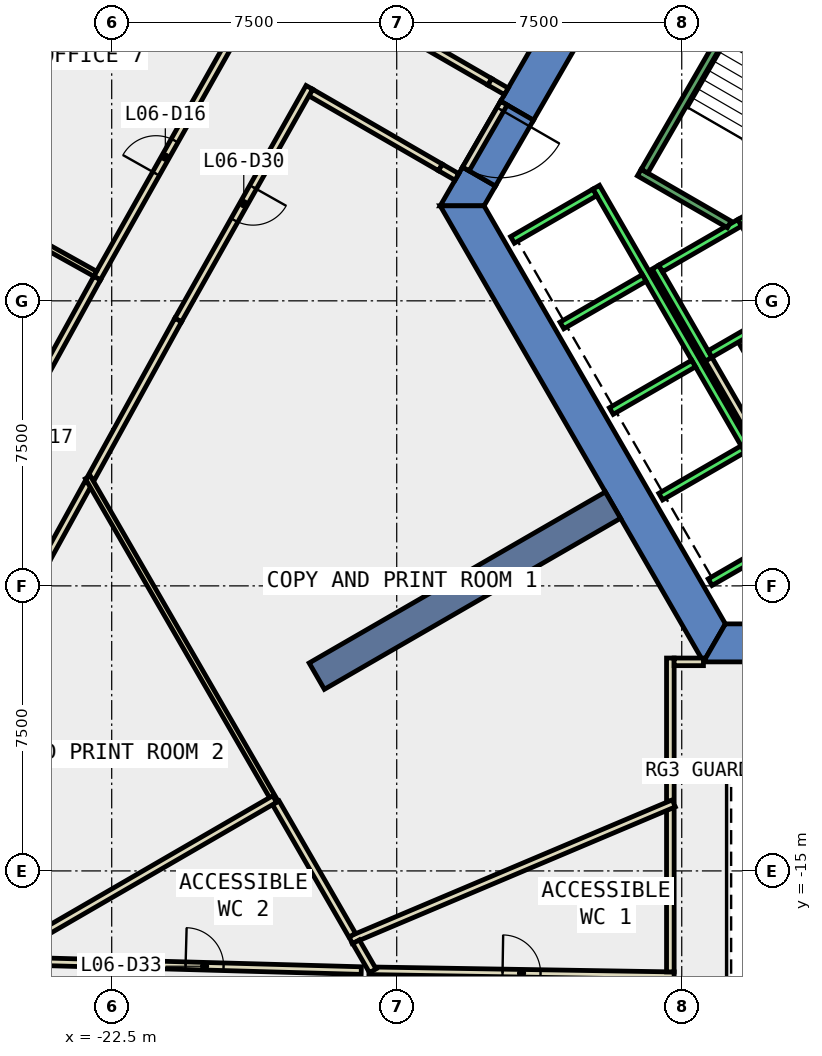
"""IFC4 building model, lengths in metres.
Left out: names, types, materials, properties, quantities, classifications, styles, units other than length and angle.
Written with IfcOpenShell. Run it as: python <this file> out.ifc"""

import sys

from ifc_helpers import new_model, si_unit, direction, frame, frame_2d, origin, place, context, subcontext, project, spatial, polyline, rectangle, outline, extrude, element, fill, save


model = new_model("IFC4")
c1 = context("Model", 3, precision=1e-05, world=origin(), true_north=direction((0.0, 1.0)))
c2 = subcontext(c1, "Body", "Model", "MODEL_VIEW")
j1 = project(units=[si_unit("LENGTHUNIT", "METRE"), si_unit("PLANEANGLEUNIT", "RADIAN")], contexts=[c1])
p1 = place(None, origin())
s1 = spatial("IfcSite", under=j1, at=p1, CompositionType="ELEMENT")
p2 = place(p1, origin())
s2 = spatial("IfcBuilding", under=s1, at=p2, CompositionType="ELEMENT")
p3 = place(p2, frame((0.0, 0.0, 35.0)))
s3 = spatial("IfcBuildingStorey", under=s2, at=p3, CompositionType="ELEMENT", Elevation=35.0)
p4 = place(p3, frame((0.0, 0.0, -0.6)))
e1 = element("IfcWall", 1, at=p4, inside=s3, PredefinedType="SHEAR", context=c2, shape_type="SweptSolid", body=[
    extrude(outline(polyline([(-12.267, 5.252), (-11.402, 4.752), (-6.351, 13.5), (-6.928, 14.5), (-12.267, 5.252)])), origin(), (0.0, 0.0, 1.0), 4.4),
])
p5 = place(p3, frame((0.0, 0.0, -0.6)))
e2 = element("IfcWall", 2, at=p5, inside=s3, PredefinedType="SHEAR", context=c2, shape_type="SweptSolid", body=[
    extrude(outline(polyline([(-12.402, 3.02), (-13.267, 3.52), (-13.856, 2.5), (-12.702, 2.5), (-12.402, 3.02)])), origin(), (0.0, 0.0, 1.0), 4.4),
])
p6 = place(p3, frame((0.0, 0.0, 3.6)))
e3 = element("IfcWall", 3, at=p6, inside=s3, PredefinedType="SHEAR", context=c2, shape_type="SweptSolid", body=[
    extrude(outline(polyline([(-13.267, 3.52), (-12.402, 3.02), (-11.402, 4.752), (-12.267, 5.252), (-13.267, 3.52)])), origin(), (0.0, 0.0, 1.0), 0.2),
])
p7 = place(p3, frame((0.0, 0.0, -0.6)))
e4 = element("IfcWall", 4, at=p7, inside=s3, PredefinedType="SHEAR", context=c2, shape_type="SweptSolid", body=[
    extrude(outline(polyline([(-13.856, 2.5), (-6.928, -9.5), (-6.351, -8.5), (-12.702, 2.5), (-13.856, 2.5)])), origin(), (0.0, 0.0, 1.0), 4.4),
])
p8 = place(p3, frame((0.0, 0.0, -0.6)))
e5 = element("IfcWall", 5, at=p8, inside=s3, PredefinedType="SHEAR", context=c2, shape_type="SweptSolid", body=[
    extrude(outline(polyline([(3.75, -9.5), (3.75, -8.5), (-6.351, -8.5), (-6.928, -9.5), (3.75, -9.5)])), origin(), (0.0, 0.0, 1.0), 4.4),
])
p9 = place(p3, frame((-9.31, -5.375, -0.6), z_axis=(0.0, 0.0, 1.0), x_axis=(-0.866017533419, -0.500013631625, 0.0)))
e6 = element("IfcWall", 6, at=p9, inside=s3, PredefinedType="SHEAR", context=c2, shape_type="SweptSolid", body=[
    extrude(rectangle(XDim=9.0, YDim=0.8, at=frame_2d((4.5, 0.0))), origin(), (0.0, 0.0, 1.0), 4.4),
])
p10 = place(p3, frame((-15.963, 7.733, 0.0), z_axis=(0.0, 0.0, 1.0), x_axis=(0.865965832374, -0.500103166518, 0.0)))
e7 = element("IfcWall", 7, at=p10, inside=s3, PredefinedType="PARTITIONING", context=c2, shape_type="SweptSolid", body=[
    extrude(rectangle(XDim=3.941, YDim=0.2, at=frame_2d((1.971, 0.0))), origin(), (0.0, 0.0, 1.0), 3.8),
])
p11 = place(p3, frame((-17.261, 5.48, 0.0), z_axis=(0.0, 0.0, 1.0), x_axis=(0.865949187497, -0.500131987253, 0.0)))
e8 = element("IfcWall", 8, at=p11, inside=s3, PredefinedType="PARTITIONING", context=c2, shape_type="SweptSolid", body=[
    extrude(rectangle(XDim=3.939, YDim=0.2, at=frame_2d((1.969, 0.0))), origin(), (0.0, 0.0, 1.0), 3.8),
])
p12 = place(p3, frame((-17.299, 5.617, 0.0), z_axis=(0.0, 0.0, 1.0), x_axis=(-0.491166441632, -0.871065741844, 0.0)))
e9 = element("IfcWall", 9, at=p12, inside=s3, PredefinedType="PARTITIONING", context=c2, shape_type="SweptSolid", body=[
    extrude(rectangle(XDim=7.028, YDim=0.2, at=frame_2d((3.514, 0.0))), origin(), (0.0, 0.0, 1.0), 3.8),
])
p13 = place(p12, frame((3.014, 0.0, 0.0)))
e10 = element("IfcOpeningElement", 10, at=p13, cuts=e9, PredefinedType="OPENING", context=c2, shape_type="SweptSolid", body=[
    extrude(rectangle(XDim=1.0, YDim=2.1, at=frame_2d((0.5, 1.05))), frame((0.0, 0.11, 0.0), z_axis=(0.0, -1.0, 0.0), x_axis=(1.0, 0.0, 0.0)), (0.0, 0.0, 1.0), 0.22),
])
p14 = place(p3, frame((-20.751, -0.505, 0.0), z_axis=(0.0, 0.0, 1.0), x_axis=(-0.482566110981, -0.875859548405, 0.0)))
e11 = element("IfcWall", 11, at=p14, inside=s3, PredefinedType="PARTITIONING", context=c2, shape_type="SweptSolid", body=[
    extrude(rectangle(XDim=4.748, YDim=0.2, at=frame_2d((2.374, 0.0))), origin(), (0.0, 0.0, 1.0), 3.8),
])
p15 = place(p3, frame((-15.73, -17.627, 0.0), z_axis=(0.0, 0.0, 1.0), x_axis=(0.999866746812, -0.016324479129, 0.0)))
e12 = element("IfcWall", 12, at=p15, inside=s3, PredefinedType="PARTITIONING", context=c2, shape_type="SweptSolid", body=[
    extrude(rectangle(XDim=8.031, YDim=0.2, at=frame_2d((4.016, 0.0))), origin(), (0.0, 0.0, 1.0), 3.8),
])
p16 = place(p15, frame((3.515, 0.0, 0.0)))
e13 = element("IfcOpeningElement", 13, at=p16, cuts=e12, PredefinedType="OPENING", context=c2, shape_type="SweptSolid", body=[
    extrude(rectangle(XDim=1.0, YDim=2.1, at=frame_2d((0.5, 1.05))), frame((0.0, 0.11, 0.0), z_axis=(0.0, -1.0, 0.0), x_axis=(1.0, 0.0, 0.0)), (0.0, 0.0, 1.0), 0.22),
])
p17 = place(p3, frame((-23.114, -4.794, 0.0), z_axis=(0.0, 0.0, 1.0), x_axis=(-0.482482362329, -0.875905685586, 0.0)))
e14 = element("IfcWall", 14, at=p17, inside=s3, PredefinedType="PARTITIONING", context=c2, shape_type="SweptSolid", body=[
    extrude(rectangle(XDim=2.311, YDim=0.2, at=frame_2d((1.156, 0.0))), origin(), (0.0, 0.0, 1.0), 3.8),
])
p18 = place(p3, frame((-24.18, -17.393, 0.0), z_axis=(0.0, 0.0, 1.0), x_axis=(0.999611380121, -0.02787631132, 0.0)))
e15 = element("IfcWall", 15, at=p18, inside=s3, PredefinedType="PARTITIONING", context=c2, shape_type="SweptSolid", body=[
    extrude(rectangle(XDim=8.25, YDim=0.2, at=frame_2d((4.125, 0.0))), origin(), (0.0, 0.0, 1.0), 3.8),
])
p19 = place(p18, frame((3.625, 0.0, 0.0)))
e16 = element("IfcOpeningElement", 16, at=p19, cuts=e15, PredefinedType="OPENING", context=c2, shape_type="SweptSolid", body=[
    extrude(rectangle(XDim=1.0, YDim=2.1, at=frame_2d((0.5, 1.05))), frame((0.0, 0.11, 0.0), z_axis=(0.0, -1.0, 0.0), x_axis=(1.0, 0.0, 0.0)), (0.0, 0.0, 1.0), 0.22),
])
p20 = place(p3, frame((-22.884, 0.598, 0.0), z_axis=(0.0, 0.0, 1.0), x_axis=(0.491206176175, 0.871043335597, 0.0)))
e17 = element("IfcWall", 17, at=p20, inside=s3, PredefinedType="PARTITIONING", context=c2, shape_type="SweptSolid", body=[
    extrude(rectangle(XDim=7.309, YDim=0.2, at=frame_2d((3.654, 0.0))), origin(), (0.0, 0.0, 1.0), 3.8),
])
p21 = place(p20, frame((3.154, 0.0, 0.0)))
e18 = element("IfcOpeningElement", 18, at=p21, cuts=e17, PredefinedType="OPENING", context=c2, shape_type="SweptSolid", body=[
    extrude(rectangle(XDim=1.0, YDim=2.1, at=frame_2d((0.5, 1.05))), frame((0.0, 0.11, 0.0), z_axis=(0.0, -1.0, 0.0), x_axis=(1.0, 0.0, 0.0)), (0.0, 0.0, 1.0), 0.22),
])
p22 = place(p3, frame((-26.373, -5.736, 0.0), z_axis=(0.0, 0.0, 1.0), x_axis=(0.482587313112, 0.875847866483, 0.0)))
e19 = element("IfcWall", 19, at=p22, inside=s3, PredefinedType="PARTITIONING", context=c2, shape_type="SweptSolid", body=[
    extrude(rectangle(XDim=7.232, YDim=0.2, at=frame_2d((3.616, 0.0))), origin(), (0.0, 0.0, 1.0), 3.8),
])
p23 = place(p22, frame((3.191, 0.0, 0.0)))
e20 = element("IfcOpeningElement", 20, at=p23, cuts=e19, PredefinedType="OPENING", context=c2, shape_type="SweptSolid", body=[
    extrude(rectangle(XDim=1.0, YDim=2.1, at=frame_2d((0.5, 1.05))), frame((0.0, 0.11, 0.0), z_axis=(0.0, -1.0, 0.0), x_axis=(1.0, 0.0, 0.0)), (0.0, 0.0, 1.0), 0.22),
])
p24 = place(p3, frame((-5.126, -2.422, 0.0), z_axis=(0.0, 0.0, 1.0), x_axis=(-0.500062241894, 0.865989465428, 0.0)))
e21 = element("IfcWall", 21, at=p24, inside=s3, PredefinedType="PARTITIONING", context=c2, shape_type="SweptSolid", body=[
    extrude(rectangle(XDim=1.7, YDim=0.2, at=frame_2d((0.85, 0.0))), origin(), (0.0, 0.0, 1.0), 3.8),
])
p25 = place(p3, frame((-5.492, -3.788, 0.0), z_axis=(0.0, 0.0, 1.0), x_axis=(-0.500008949224, 0.866020236886, 0.0)))
e22 = element("IfcWall", 22, at=p25, inside=s3, PredefinedType="PARTITIONING", context=c2, shape_type="SweptSolid", body=[
    extrude(rectangle(XDim=2.68, YDim=0.2, at=frame_2d((1.34, 0.0))), origin(), (0.0, 0.0, 1.0), 3.8),
])
p26 = place(p3, frame((-7.8, -13.161, 0.0), z_axis=(0.0, 0.0, 1.0), x_axis=(0.0, 1.0, 0.0)))
e23 = element("IfcWall", 23, at=p26, inside=s3, PredefinedType="PARTITIONING", context=c2, shape_type="SweptSolid", body=[
    extrude(rectangle(XDim=3.762, YDim=0.2, at=frame_2d((1.881, 0.0))), origin(), (0.0, 0.0, 1.0), 3.8),
])
p27 = place(p3, frame((-7.7, -9.499, 0.0), z_axis=(0.0, 0.0, 1.0), x_axis=(1.0, 0.0, 0.0)))
e24 = element("IfcWall", 24, at=p27, inside=s3, PredefinedType="PARTITIONING", context=c2, shape_type="SweptSolid", body=[
    extrude(rectangle(XDim=0.771, YDim=0.2, at=frame_2d((0.385, 0.0))), origin(), (0.0, 0.0, 1.0), 3.8),
])
p28 = place(p3, frame((-7.8, -17.657, 0.0), z_axis=(0.0, 0.0, 1.0), x_axis=(0.0, 1.0, 0.0)))
e25 = element("IfcWall", 25, at=p28, inside=s3, PredefinedType="PARTITIONING", context=c2, shape_type="SweptSolid", body=[
    extrude(rectangle(XDim=4.296, YDim=0.2, at=frame_2d((2.148, 0.0))), origin(), (0.0, 0.0, 1.0), 3.8),
])
p29 = place(p3, frame((-7.708, -13.222, 0.0), z_axis=(0.0, 0.0, 1.0), x_axis=(-0.921093468555, -0.389341523839, 0.0)))
e26 = element("IfcWall", 26, at=p29, inside=s3, PredefinedType="PARTITIONING", context=c2, shape_type="SweptSolid", body=[
    extrude(rectangle(XDim=9.233, YDim=0.2, at=frame_2d((4.617, 0.0))), origin(), (0.0, 0.0, 1.0), 3.8),
])
p30 = place(p3, frame((-18.182, -13.207, 0.0), z_axis=(0.0, 0.0, 1.0), x_axis=(-0.500081416649, 0.865978392757, 0.0)))
e27 = element("IfcWall", 27, at=p30, inside=s3, PredefinedType="PARTITIONING", context=c2, shape_type="SweptSolid", body=[
    extrude(rectangle(XDim=9.89, YDim=0.15, at=frame_2d((4.945, 0.0))), origin(), (0.0, 0.0, 1.0), 3.8),
])
p31 = place(p3, frame((-16.171, -16.692, 0.0), z_axis=(0.0, 0.0, 1.0), x_axis=(-0.499813503007, 0.866133051102, 0.0)))
e28 = element("IfcWall", 28, at=p31, inside=s3, PredefinedType="PARTITIONING", context=c2, shape_type="SweptSolid", body=[
    extrude(rectangle(XDim=4.023, YDim=0.2, at=frame_2d((2.012, 0.0))), origin(), (0.0, 0.0, 1.0), 3.8),
])
p32 = place(p3, frame((-15.63, -17.628, 0.0), z_axis=(0.0, 0.0, 1.0), x_axis=(-0.500577563191, 0.865691690632, 0.0)))
e29 = element("IfcWall", 29, at=p32, inside=s3, PredefinedType="PARTITIONING", context=c2, shape_type="SweptSolid", body=[
    extrude(rectangle(XDim=0.881, YDim=0.2, at=frame_2d((0.441, 0.0))), origin(), (0.0, 0.0, 1.0), 3.8),
])
p33 = place(p3, frame((-18.211, -13.108, 0.0), z_axis=(0.0, 0.0, 1.0), x_axis=(-0.865421721769, -0.501044153235, 0.0)))
e30 = element("IfcWall", 30, at=p33, inside=s3, PredefinedType="PARTITIONING", context=c2, shape_type="SweptSolid", body=[
    extrude(rectangle(XDim=8.546, YDim=0.2, at=frame_2d((4.273, 0.0))), origin(), (0.0, 0.0, 1.0), 3.8),
])
p34 = place(p3, frame((-22.935, 0.712, 0.0), z_axis=(0.0, 0.0, 1.0), x_axis=(-0.873395616379, 0.487011393389, 0.0)))
e31 = element("IfcWall", 31, at=p34, inside=s3, PredefinedType="PARTITIONING", context=c2, shape_type="SweptSolid", body=[
    extrude(rectangle(XDim=6.48, YDim=0.15, at=frame_2d((3.24, 0.0))), origin(), (0.0, 0.0, 1.0), 3.8),
])
p35 = place(p3, frame((-12.18, 5.202, 0.0), z_axis=(0.0, 0.0, 1.0), x_axis=(-0.50002537861, -0.866010750942, 0.0)))
e32 = element("IfcWall", 32, at=p35, inside=s3, PredefinedType="PARTITIONING", context=c2, shape_type="SweptSolid", body=[
    extrude(rectangle(XDim=2.0, YDim=0.2, at=frame_2d((1.0, 0.0))), origin(), (0.0, 0.0, 1.0), 2.4),
])
p36 = place(p35, frame((0.19, 0.0, 0.0)))
e33 = element("IfcOpeningElement", 33, at=p36, cuts=e32, PredefinedType="OPENING", context=c2, shape_type="SweptSolid", body=[
    extrude(rectangle(XDim=1.8, YDim=2.1, at=frame_2d((0.9, 1.05))), frame((0.0, 0.11, 0.0), z_axis=(0.0, -1.0, 0.0), x_axis=(1.0, 0.0, 0.0)), (0.0, 0.0, 1.0), 0.22),
])
for number, where, z_axis, x_axis in (
    (34, (-12.55, 5.762, 0.0), (0.0, 0.0, 1.0), (0.866, -0.5, 0.0)),
    (35, (-13.85, 3.51, 0.0), (0.0, 0.0, 1.0), (0.866, -0.5, 0.0)),
):
    element("IfcWall", number, at=place(p3, frame(where, z_axis=z_axis, x_axis=x_axis)), inside=s3, PredefinedType="PARTITIONING", context=c2, shape_type="SweptSolid", body=[
        extrude(rectangle(XDim=0.5, YDim=0.2, at=frame_2d((0.25, 0.0))), origin(), (0.0, 0.0, 1.0), 2.4),
    ])
p37 = place(p3, frame((-5.94, 2.188, 0.0), z_axis=(0.0, 0.0, 1.0), x_axis=(0.49994636267, -0.866056369097, 0.0)))
e36 = element("IfcWall", 36, at=p37, inside=s3, PredefinedType="STANDARD", context=c2, shape_type="SweptSolid", body=[
    extrude(rectangle(XDim=2.8, YDim=0.2, at=frame_2d((1.4, 0.0))), origin(), (0.0, 0.0, 1.0), 3.8),
])
p38 = place(p37, frame((1.225, 0.0, 0.0)))
e37 = element("IfcOpeningElement", 37, at=p38, cuts=e36, PredefinedType="OPENING", context=c2, shape_type="SweptSolid", body=[
    extrude(rectangle(XDim=1.1, YDim=2.1, at=frame_2d((0.55, 1.05))), frame((0.0, 0.11, 0.0), z_axis=(0.0, -1.0, 0.0), x_axis=(1.0, 0.0, 0.0)), (0.0, 0.0, 1.0), 0.22),
])
p39 = place(p3, frame((-8.192, 0.888, 0.0), z_axis=(0.0, 0.0, 1.0), x_axis=(0.49994636267, -0.866056369097, 0.0)))
e38 = element("IfcWall", 38, at=p39, inside=s3, PredefinedType="STANDARD", context=c2, shape_type="SweptSolid", body=[
    extrude(rectangle(XDim=2.8, YDim=0.2, at=frame_2d((1.4, 0.0))), origin(), (0.0, 0.0, 1.0), 3.8),
])
for number, where, z_axis, x_axis in (
    (39, (-5.977, 2.052, 0.0), (0.0, 0.0, 1.0), (-0.866, -0.5, 0.0)),
    (40, (-4.677, -0.2, 0.0), (0.0, 0.0, 1.0), (-0.866, -0.5, 0.0)),
):
    element("IfcWall", number, at=place(p3, frame(where, z_axis=z_axis, x_axis=x_axis)), inside=s3, PredefinedType="STANDARD", context=c2, shape_type="SweptSolid", body=[
        extrude(rectangle(XDim=2.399, YDim=0.2, at=frame_2d((1.2, 0.0))), origin(), (0.0, 0.0, 1.0), 3.8),
    ])
p40 = place(p3, frame((-9.751, 2.99, 0.0), z_axis=(0.0, 0.0, 1.0), x_axis=(0.50000090737, -0.866024879913, 0.0)))
e41 = element("IfcWall", 41, at=p40, inside=s3, PredefinedType="STANDARD", context=c2, shape_type="SweptSolid", body=[
    extrude(rectangle(XDim=10.6, YDim=0.2, at=frame_2d((5.3, 0.0))), origin(), (0.0, 0.0, 1.0), 3.8),
])
p41 = place(p3, frame((-9.788, 2.853, 0.0), z_axis=(0.0, 0.0, 1.0), x_axis=(-0.865998541277, -0.500046524342, 0.0)))
e42 = element("IfcWall", 42, at=p41, inside=s3, PredefinedType="STANDARD", context=c2, shape_type="SweptSolid", body=[
    extrude(rectangle(XDim=2.5, YDim=0.2, at=frame_2d((1.25, 0.0))), origin(), (0.0, 0.0, 1.0), 3.8),
])
for number, where, z_axis, x_axis in (
    (43, (-8.488, 0.602, 0.0), (0.0, 0.0, 1.0), (-0.866, -0.5, 0.0)),
    (44, (-7.188, -1.65, 0.0), (0.0, 0.0, 1.0), (-0.866, -0.5, 0.0)),
    (45, (-5.888, -3.902, 0.0), (0.0, 0.0, 1.0), (-0.866, -0.5, 0.0)),
    (46, (-4.588, -6.153, 0.0), (0.0, 0.0, 1.0), (-0.866, -0.5, 0.0)),
):
    element("IfcWall", number, at=place(p3, frame(where, z_axis=z_axis, x_axis=x_axis)), inside=s3, PredefinedType="STANDARD", context=c2, shape_type="SweptSolid", body=[
        extrude(rectangle(XDim=2.5, YDim=0.2, at=frame_2d((1.25, 0.0))), origin(), (0.0, 0.0, 1.0), 3.8),
    ])
p42 = place(p3, frame((-6.25, 2.01, 0.0), z_axis=(0.0, 0.0, 1.0), x_axis=(-0.86611865017, 0.499838457731, 0.0)))
e47 = element("IfcWall", 47, at=p42, inside=s3, PredefinedType="STANDARD", context=c2, shape_type="SweptSolid", body=[
    extrude(rectangle(XDim=2.733, YDim=0.2, at=frame_2d((1.366, 0.0))), origin(), (0.0, 0.0, 1.0), 3.8),
])
p43 = place(p3, frame((-5.03, 9.388, 0.0), z_axis=(0.0, 0.0, 1.0), x_axis=(-0.499978703459, -0.866037698999, 0.0)))
e48 = element("IfcWall", 48, at=p43, inside=s3, PredefinedType="STANDARD", context=c2, shape_type="SweptSolid", body=[
    extrude(rectangle(XDim=6.9, YDim=0.2, at=frame_2d((3.45, 0.0))), origin(), (0.0, 0.0, 1.0), 3.8),
])
p44 = place(p21, origin())
e49 = element("IfcDoor", 49, at=p44, inside=s3, OperationType="SINGLE_SWING_RIGHT", PredefinedType="DOOR", context=c2, shape_type="SweptSolid", body=[
    extrude(rectangle(XDim=1.0, YDim=2.1, at=frame_2d((0.5, 1.05))), frame((0.0, 0.025, 0.0), z_axis=(0.0, -1.0, 0.0), x_axis=(1.0, 0.0, 0.0)), (0.0, 0.0, 1.0), 0.05),
])
fill(e18, e49)
p45 = place(p13, origin())
e50 = element("IfcDoor", 50, at=p45, inside=s3, OperationType="SINGLE_SWING_RIGHT", PredefinedType="DOOR", context=c2, shape_type="SweptSolid", body=[
    extrude(rectangle(XDim=1.0, YDim=2.1, at=frame_2d((0.5, 1.05))), frame((0.0, 0.025, 0.0), z_axis=(0.0, -1.0, 0.0), x_axis=(1.0, 0.0, 0.0)), (0.0, 0.0, 1.0), 0.05),
])
fill(e10, e50)
p46 = place(p16, origin())
e51 = element("IfcDoor", 51, at=p46, inside=s3, OperationType="SINGLE_SWING_LEFT", PredefinedType="DOOR", context=c2, shape_type="SweptSolid", body=[
    extrude(rectangle(XDim=1.0, YDim=2.1, at=frame_2d((0.5, 1.05))), frame((0.0, 0.025, 0.0), z_axis=(0.0, -1.0, 0.0), x_axis=(1.0, 0.0, 0.0)), (0.0, 0.0, 1.0), 0.05),
])
fill(e13, e51)
p47 = place(p19, origin())
e52 = element("IfcDoor", 52, at=p47, inside=s3, OperationType="SINGLE_SWING_RIGHT", PredefinedType="DOOR", context=c2, shape_type="SweptSolid", body=[
    extrude(rectangle(XDim=1.0, YDim=2.1, at=frame_2d((0.5, 1.05))), frame((0.0, 0.025, 0.0), z_axis=(0.0, -1.0, 0.0), x_axis=(1.0, 0.0, 0.0)), (0.0, 0.0, 1.0), 0.05),
])
fill(e16, e52)
p48 = place(p36, origin())
e53 = element("IfcDoor", 53, at=p48, inside=s3, OperationType="DOUBLE_DOOR_SINGLE_SWING", PredefinedType="DOOR", context=c2, shape_type="SweptSolid", body=[
    extrude(rectangle(XDim=1.8, YDim=2.1, at=frame_2d((0.9, 1.05))), frame((0.0, 0.025, 0.0), z_axis=(0.0, -1.0, 0.0), x_axis=(1.0, 0.0, 0.0)), (0.0, 0.0, 1.0), 0.05),
])
fill(e33, e53)
save(model, sys.argv[1])
